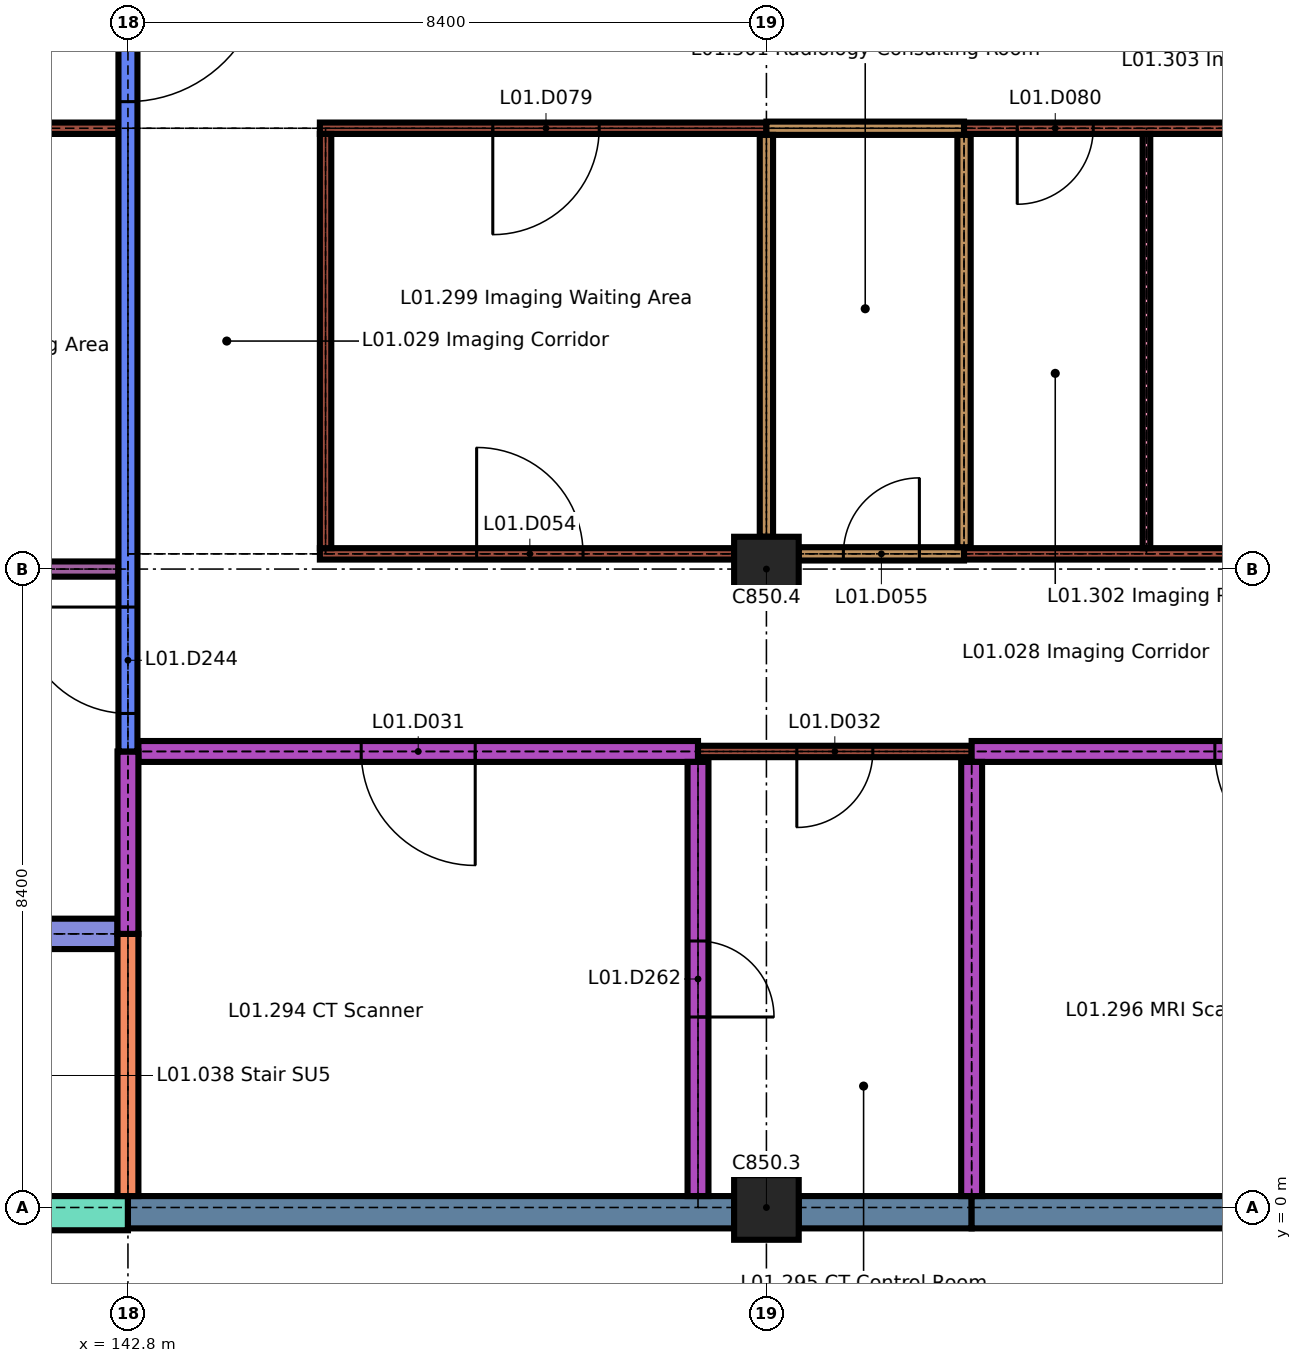
"""IFC4 building model, lengths in metres.
Left out: names, types, materials, properties, quantities, classifications, styles, units other than length and angle.
Written with IfcOpenShell. Run it as: python <this file> out.ifc"""

import sys

from ifc_helpers import new_model, si_unit, direction, frame, frame_2d, origin, origin_2d, place, context, subcontext, project, spatial, rectangle, extrude, element, fill, save


model = new_model("IFC4")
c1 = context("Model", 3, precision=1e-05, world=origin(), true_north=direction((0.0, 1.0)))
c2 = subcontext(c1, "Body", "Model", "MODEL_VIEW")
j1 = project(units=[si_unit("LENGTHUNIT", "METRE"), si_unit("PLANEANGLEUNIT", "RADIAN")], contexts=[c1])
p1 = place(None, origin())
s1 = spatial("IfcSite", under=j1, at=p1, CompositionType="ELEMENT")
p2 = place(p1, origin())
s2 = spatial("IfcBuilding", under=s1, at=p2, CompositionType="ELEMENT")
p3 = place(p2, frame((0.0, 0.0, 4.5)))
s3 = spatial("IfcBuildingStorey", under=s2, at=p3, CompositionType="ELEMENT", Elevation=4.5)
for number, where, z_axis, x_axis in (
    (1, (151.2, 0.0, 0.0), (0.0, 0.0, 1.0), (1.0, 0.0, 0.0)),
    (2, (151.2, 8.4, 0.0), (0.0, 0.0, 1.0), (1.0, 0.0, 0.0)),
):
    element("IfcColumn", number, at=place(p3, frame(where, z_axis=z_axis, x_axis=x_axis)), inside=s3, PredefinedType="COLUMN", context=c2, shape_type="SweptSolid", body=[
        extrude(rectangle(XDim=0.85, YDim=0.85, at=origin_2d()), origin(), (0.0, 0.0, 1.0), 3.45),
    ])
p4 = place(p3, frame((138.95, -0.075, 0.0), z_axis=(0.0, 0.0, 1.0), x_axis=(1.0, 0.0, 0.0)))
e3 = element("IfcWall", 3, at=p4, inside=s3, PredefinedType="SOLIDWALL", context=c2, shape_type="SweptSolid", body=[
    extrude(rectangle(XDim=3.85, YDim=0.45, at=frame_2d((1.925, 0.0))), origin(), (0.0, 0.0, 1.0), 3.45),
])
p5 = place(p3, frame((142.8, -0.062, 0.0), z_axis=(0.0, 0.0, 1.0), x_axis=(1.0, 0.0, 0.0)))
e4 = element("IfcWall", 4, at=p5, inside=s3, PredefinedType="SOLIDWALL", context=c2, shape_type="SweptSolid", body=[
    extrude(rectangle(XDim=7.975, YDim=0.425, at=frame_2d((3.987, 0.0))), origin(), (0.0, 0.0, 1.0), 3.15),
])
p6 = place(p3, frame((151.625, -0.062, 0.0), z_axis=(0.0, 0.0, 1.0), x_axis=(1.0, 0.0, 0.0)))
e5 = element("IfcWall", 5, at=p6, inside=s3, PredefinedType="SOLIDWALL", context=c2, shape_type="SweptSolid", body=[
    extrude(rectangle(XDim=2.275, YDim=0.425, at=frame_2d((1.137, 0.0))), origin(), (0.0, 0.0, 1.0), 3.15),
])
p7 = place(p3, frame((153.9, -0.062, 0.0), z_axis=(0.0, 0.0, 1.0), x_axis=(1.0, 0.0, 0.0)))
e6 = element("IfcWall", 6, at=p7, inside=s3, PredefinedType="SOLIDWALL", context=c2, shape_type="SweptSolid", body=[
    extrude(rectangle(XDim=5.275, YDim=0.425, at=frame_2d((2.638, 0.0))), origin(), (0.0, 0.0, 1.0), 3.15),
])
p8 = place(p3, frame((134.6, 3.6, 0.0), z_axis=(0.0, 0.0, 1.0), x_axis=(1.0, 0.0, 0.0)))
e7 = element("IfcWall", 7, at=p8, inside=s3, PredefinedType="SHEAR", context=c2, shape_type="SweptSolid", body=[
    extrude(rectangle(XDim=8.062, YDim=0.4, at=frame_2d((4.031, 0.0))), origin(), (0.0, 0.0, 1.0), 3.45),
])
p9 = place(p8, frame((0.4, 0.0, 0.0)))
e8 = element("IfcOpeningElement", 8, at=p9, cuts=e7, PredefinedType="OPENING", context=c2, shape_type="SweptSolid", body=[
    extrude(rectangle(XDim=1.2, YDim=2.1, at=frame_2d((0.6, 1.05))), frame((0.0, 0.21, 0.0), z_axis=(0.0, -1.0, 0.0), x_axis=(1.0, 0.0, 0.0)), (0.0, 0.0, 1.0), 0.42),
])
p10 = place(p3, frame((142.938, 6.0, 0.0), z_axis=(0.0, 0.0, 1.0), x_axis=(1.0, 0.0, 0.0)))
e9 = element("IfcWall", 9, at=p10, inside=s3, PredefinedType="SOLIDWALL", context=c2, shape_type="SweptSolid", body=[
    extrude(rectangle(XDim=7.363, YDim=0.275, at=frame_2d((3.681, 0.0))), origin(), (0.0, 0.0, 1.0), 3.45),
])
p11 = place(p10, frame((2.931, 0.0, 0.0)))
e10 = element("IfcOpeningElement", 10, at=p11, cuts=e9, PredefinedType="OPENING", context=c2, shape_type="SweptSolid", body=[
    extrude(rectangle(XDim=1.5, YDim=2.4, at=frame_2d((0.75, 1.2))), frame((0.0, 0.147, 0.0), z_axis=(0.0, -1.0, 0.0), x_axis=(1.0, 0.0, 0.0)), (0.0, 0.0, 1.0), 0.295),
])
p12 = place(p3, frame((150.3, 6.0, 0.0), z_axis=(0.0, 0.0, 1.0), x_axis=(1.0, 0.0, 0.0)))
e11 = element("IfcWall", 11, at=p12, inside=s3, PredefinedType="PARTITIONING", context=c2, shape_type="SweptSolid", body=[
    extrude(rectangle(XDim=3.6, YDim=0.15, at=frame_2d((1.8, 0.0))), origin(), (0.0, 0.0, 1.0), 3.45),
])
p13 = place(p12, frame((1.3, 0.0, 0.0)))
e12 = element("IfcOpeningElement", 12, at=p13, cuts=e11, PredefinedType="OPENING", context=c2, shape_type="SweptSolid", body=[
    extrude(rectangle(XDim=1.0, YDim=2.1, at=frame_2d((0.5, 1.05))), frame((0.0, 0.085, 0.0), z_axis=(0.0, -1.0, 0.0), x_axis=(1.0, 0.0, 0.0)), (0.0, 0.0, 1.0), 0.17),
])
p14 = place(p3, frame((153.9, 6.0, 0.0), z_axis=(0.0, 0.0, 1.0), x_axis=(1.0, 0.0, 0.0)))
e13 = element("IfcWall", 13, at=p14, inside=s3, PredefinedType="SOLIDWALL", context=c2, shape_type="SweptSolid", body=[
    extrude(rectangle(XDim=7.9, YDim=0.275, at=frame_2d((3.95, 0.0))), origin(), (0.0, 0.0, 1.0), 3.45),
])
p15 = place(p14, frame((3.2, 0.0, 0.0)))
e14 = element("IfcOpeningElement", 14, at=p15, cuts=e13, PredefinedType="OPENING", context=c2, shape_type="SweptSolid", body=[
    extrude(rectangle(XDim=1.5, YDim=2.4, at=frame_2d((0.75, 1.2))), frame((0.0, 0.147, 0.0), z_axis=(0.0, -1.0, 0.0), x_axis=(1.0, 0.0, 0.0)), (0.0, 0.0, 1.0), 0.295),
])
p16 = place(p3, frame((134.5, 8.4, 0.0), z_axis=(0.0, 0.0, 1.0), x_axis=(1.0, 0.0, 0.0)))
e15 = element("IfcWall", 15, at=p16, inside=s3, PredefinedType="PARTITIONING", context=c2, shape_type="SweptSolid", body=[
    extrude(rectangle(XDim=8.175, YDim=0.2, at=frame_2d((4.087, 0.0))), origin(), (0.0, 0.0, 1.0), 3.45),
])
p17 = place(p16, frame((3.387, 0.0, 0.0)))
e16 = element("IfcOpeningElement", 16, at=p17, cuts=e15, PredefinedType="OPENING", context=c2, shape_type="SweptSolid", body=[
    extrude(rectangle(XDim=1.4, YDim=2.1, at=frame_2d((0.7, 1.05))), frame((0.0, 0.11, 0.0), z_axis=(0.0, -1.0, 0.0), x_axis=(1.0, 0.0, 0.0)), (0.0, 0.0, 1.0), 0.22),
])
p18 = place(p3, frame((145.325, 8.6, 0.0), z_axis=(0.0, 0.0, 1.0), x_axis=(1.0, 0.0, 0.0)))
e17 = element("IfcWall", 17, at=p18, inside=s3, PredefinedType="PARTITIONING", context=c2, shape_type="SweptSolid", body=[
    extrude(rectangle(XDim=5.45, YDim=0.15, at=frame_2d((2.725, 0.0))), origin(), (0.0, 0.0, 1.0), 3.45),
])
p19 = place(p18, frame((2.062, 0.0, 0.0)))
e18 = element("IfcOpeningElement", 18, at=p19, cuts=e17, PredefinedType="OPENING", context=c2, shape_type="SweptSolid", body=[
    extrude(rectangle(XDim=1.4, YDim=2.1, at=frame_2d((0.7, 1.05))), frame((0.0, 0.085, 0.0), z_axis=(0.0, -1.0, 0.0), x_axis=(1.0, 0.0, 0.0)), (0.0, 0.0, 1.0), 0.17),
])
p20 = place(p3, frame((151.625, 8.6, 0.0), z_axis=(0.0, 0.0, 1.0), x_axis=(1.0, 0.0, 0.0)))
e19 = element("IfcWall", 19, at=p20, inside=s3, PredefinedType="PARTITIONING", context=c2, shape_type="SweptSolid", body=[
    extrude(rectangle(XDim=2.175, YDim=0.175, at=frame_2d((1.087, 0.0))), origin(), (0.0, 0.0, 1.0), 3.45),
])
p21 = place(p20, frame((0.587, 0.0, 0.0)))
e20 = element("IfcOpeningElement", 20, at=p21, cuts=e19, PredefinedType="OPENING", context=c2, shape_type="SweptSolid", body=[
    extrude(rectangle(XDim=1.0, YDim=2.1, at=frame_2d((0.5, 1.05))), frame((0.0, 0.097, 0.0), z_axis=(0.0, -1.0, 0.0), x_axis=(1.0, 0.0, 0.0)), (0.0, 0.0, 1.0), 0.195),
])
p22 = place(p3, frame((153.8, 8.6, 0.0), z_axis=(0.0, 0.0, 1.0), x_axis=(1.0, 0.0, 0.0)))
e21 = element("IfcWall", 21, at=p22, inside=s3, PredefinedType="PARTITIONING", context=c2, shape_type="SweptSolid", body=[
    extrude(rectangle(XDim=5.375, YDim=0.15, at=frame_2d((2.688, 0.0))), origin(), (0.0, 0.0, 1.0), 3.45),
])
p23 = place(p3, frame((131.4, 14.2, 0.0), z_axis=(0.0, 0.0, 1.0), x_axis=(1.0, 0.0, 0.0)))
e22 = element("IfcWall", 22, at=p23, inside=s3, PredefinedType="PARTITIONING", context=c2, shape_type="SweptSolid", body=[
    extrude(rectangle(XDim=11.275, YDim=0.15, at=frame_2d((5.638, 0.0))), origin(), (0.0, 0.0, 1.0), 3.45),
])
p24 = place(p23, frame((1.0, 0.0, 0.0)))
e23 = element("IfcOpeningElement", 23, at=p24, cuts=e22, PredefinedType="OPENING", context=c2, shape_type="SweptSolid", body=[
    extrude(rectangle(XDim=1.0, YDim=2.1, at=frame_2d((0.5, 1.05))), frame((0.0, 0.085, 0.0), z_axis=(0.0, -1.0, 0.0), x_axis=(1.0, 0.0, 0.0)), (0.0, 0.0, 1.0), 0.17),
])
p25 = place(p23, frame((6.438, 0.0, 0.0)))
e24 = element("IfcOpeningElement", 24, at=p25, cuts=e22, PredefinedType="OPENING", context=c2, shape_type="SweptSolid", body=[
    extrude(rectangle(XDim=1.4, YDim=2.1, at=frame_2d((0.7, 1.05))), frame((0.0, 0.085, 0.0), z_axis=(0.0, -1.0, 0.0), x_axis=(1.0, 0.0, 0.0)), (0.0, 0.0, 1.0), 0.17),
])
p26 = place(p3, frame((145.325, 14.2, 0.0), z_axis=(0.0, 0.0, 1.0), x_axis=(1.0, 0.0, 0.0)))
e25 = element("IfcWall", 25, at=p26, inside=s3, PredefinedType="PARTITIONING", context=c2, shape_type="SweptSolid", body=[
    extrude(rectangle(XDim=5.875, YDim=0.15, at=frame_2d((2.938, 0.0))), origin(), (0.0, 0.0, 1.0), 3.45),
])
p27 = place(p26, frame((2.275, 0.0, 0.0)))
e26 = element("IfcOpeningElement", 26, at=p27, cuts=e25, PredefinedType="OPENING", context=c2, shape_type="SweptSolid", body=[
    extrude(rectangle(XDim=1.4, YDim=2.1, at=frame_2d((0.7, 1.05))), frame((0.0, 0.085, 0.0), z_axis=(0.0, -1.0, 0.0), x_axis=(1.0, 0.0, 0.0)), (0.0, 0.0, 1.0), 0.17),
])
p28 = place(p3, frame((151.2, 14.2, 0.0), z_axis=(0.0, 0.0, 1.0), x_axis=(1.0, 0.0, 0.0)))
e27 = element("IfcWall", 27, at=p28, inside=s3, PredefinedType="PARTITIONING", context=c2, shape_type="SweptSolid", body=[
    extrude(rectangle(XDim=2.6, YDim=0.175, at=frame_2d((1.3, 0.0))), origin(), (0.0, 0.0, 1.0), 3.45),
])
p29 = place(p3, frame((153.8, 14.2, 0.0), z_axis=(0.0, 0.0, 1.0), x_axis=(1.0, 0.0, 0.0)))
e28 = element("IfcWall", 28, at=p29, inside=s3, PredefinedType="PARTITIONING", context=c2, shape_type="SweptSolid", body=[
    extrude(rectangle(XDim=11.875, YDim=0.15, at=frame_2d((5.938, 0.0))), origin(), (0.0, 0.0, 1.0), 3.45),
])
p30 = place(p29, frame((0.7, 0.0, 0.0)))
e29 = element("IfcOpeningElement", 29, at=p30, cuts=e28, PredefinedType="OPENING", context=c2, shape_type="SweptSolid", body=[
    extrude(rectangle(XDim=1.0, YDim=2.1, at=frame_2d((0.5, 1.05))), frame((0.0, 0.085, 0.0), z_axis=(0.0, -1.0, 0.0), x_axis=(1.0, 0.0, 0.0)), (0.0, 0.0, 1.0), 0.17),
])
p31 = place(p29, frame((3.6, 0.0, 0.0)))
e30 = element("IfcOpeningElement", 30, at=p31, cuts=e28, PredefinedType="OPENING", context=c2, shape_type="SweptSolid", body=[
    extrude(rectangle(XDim=1.0, YDim=2.1, at=frame_2d((0.5, 1.05))), frame((0.0, 0.085, 0.0), z_axis=(0.0, -1.0, 0.0), x_axis=(1.0, 0.0, 0.0)), (0.0, 0.0, 1.0), 0.17),
])
p32 = place(p3, frame((142.8, 0.15, 0.0), z_axis=(0.0, 0.0, 1.0), x_axis=(0.0, 1.0, 0.0)))
e31 = element("IfcWall", 31, at=p32, inside=s3, PredefinedType="SOLIDWALL", context=c2, shape_type="SweptSolid", body=[
    extrude(rectangle(XDim=3.45, YDim=0.275, at=frame_2d((1.725, 0.0))), origin(), (0.0, 0.0, 1.0), 3.45),
])
p33 = place(p3, frame((142.8, 3.6, 0.0), z_axis=(0.0, 0.0, 1.0), x_axis=(0.0, 1.0, 0.0)))
e32 = element("IfcWall", 32, at=p33, inside=s3, PredefinedType="SOLIDWALL", context=c2, shape_type="SweptSolid", body=[
    extrude(rectangle(XDim=2.4, YDim=0.275, at=frame_2d((1.2, 0.0))), origin(), (0.0, 0.0, 1.0), 3.45),
])
p34 = place(p3, frame((142.8, 6.0, 0.0), z_axis=(0.0, 0.0, 1.0), x_axis=(0.0, 1.0, 0.0)))
e33 = element("IfcWall", 33, at=p34, inside=s3, PredefinedType="SOLIDWALL", context=c2, shape_type="SweptSolid", body=[
    extrude(rectangle(XDim=10.7, YDim=0.25, at=frame_2d((5.35, 0.0))), origin(), (0.0, 0.0, 1.0), 3.45),
])
p35 = place(p34, frame((0.5, 0.0, 0.0)))
e34 = element("IfcOpeningElement", 34, at=p35, cuts=e33, PredefinedType="OPENING", context=c2, shape_type="SweptSolid", body=[
    extrude(rectangle(XDim=1.4, YDim=2.1, at=frame_2d((0.7, 1.05))), frame((0.0, 0.135, 0.0), z_axis=(0.0, -1.0, 0.0), x_axis=(1.0, 0.0, 0.0)), (0.0, 0.0, 1.0), 0.27),
])
p36 = place(p34, frame((8.55, 0.0, 0.0)))
e35 = element("IfcOpeningElement", 35, at=p36, cuts=e33, PredefinedType="OPENING", context=c2, shape_type="SweptSolid", body=[
    extrude(rectangle(XDim=1.8, YDim=2.4, at=frame_2d((0.9, 1.2))), frame((0.0, 0.135, 0.0), z_axis=(0.0, -1.0, 0.0), x_axis=(1.0, 0.0, 0.0)), (0.0, 0.0, 1.0), 0.27),
])
p37 = place(p3, frame((145.4, 8.675, 0.0), z_axis=(0.0, 0.0, 1.0), x_axis=(0.0, 1.0, 0.0)))
e36 = element("IfcWall", 36, at=p37, inside=s3, PredefinedType="PARTITIONING", context=c2, shape_type="SweptSolid", body=[
    extrude(rectangle(XDim=5.45, YDim=0.15, at=frame_2d((2.725, 0.0))), origin(), (0.0, 0.0, 1.0), 3.45),
])
p38 = place(p3, frame((150.3, 0.15, 0.0), z_axis=(0.0, 0.0, 1.0), x_axis=(0.0, 1.0, 0.0)))
e37 = element("IfcWall", 37, at=p38, inside=s3, PredefinedType="SOLIDWALL", context=c2, shape_type="SweptSolid", body=[
    extrude(rectangle(XDim=5.713, YDim=0.275, at=frame_2d((2.856, 0.0))), origin(), (0.0, 0.0, 1.0), 3.45),
])
p39 = place(p38, frame((2.356, 0.0, 0.0)))
e38 = element("IfcOpeningElement", 38, at=p39, cuts=e37, PredefinedType="OPENING", context=c2, shape_type="SweptSolid", body=[
    extrude(rectangle(XDim=1.0, YDim=2.1, at=frame_2d((0.5, 1.05))), frame((0.0, 0.147, 0.0), z_axis=(0.0, -1.0, 0.0), x_axis=(1.0, 0.0, 0.0)), (0.0, 0.0, 1.0), 0.295),
])
p40 = place(p3, frame((151.2, 8.825, 0.0), z_axis=(0.0, 0.0, 1.0), x_axis=(0.0, 1.0, 0.0)))
e39 = element("IfcWall", 39, at=p40, inside=s3, PredefinedType="PARTITIONING", context=c2, shape_type="SweptSolid", body=[
    extrude(rectangle(XDim=5.288, YDim=0.175, at=frame_2d((2.644, 0.0))), origin(), (0.0, 0.0, 1.0), 3.45),
])
p41 = place(p3, frame((153.8, 8.688, 0.0), z_axis=(0.0, 0.0, 1.0), x_axis=(0.0, 1.0, 0.0)))
e40 = element("IfcWall", 40, at=p41, inside=s3, PredefinedType="PARTITIONING", context=c2, shape_type="SweptSolid", body=[
    extrude(rectangle(XDim=5.425, YDim=0.175, at=frame_2d((2.712, 0.0))), origin(), (0.0, 0.0, 1.0), 3.45),
])
p42 = place(p3, frame((153.9, 0.15, 0.0), z_axis=(0.0, 0.0, 1.0), x_axis=(0.0, 1.0, 0.0)))
e41 = element("IfcWall", 41, at=p42, inside=s3, PredefinedType="SOLIDWALL", context=c2, shape_type="SweptSolid", body=[
    extrude(rectangle(XDim=5.713, YDim=0.275, at=frame_2d((2.856, 0.0))), origin(), (0.0, 0.0, 1.0), 3.45),
])
p43 = place(p3, frame((156.2, 8.675, 0.0), z_axis=(0.0, 0.0, 1.0), x_axis=(0.0, 1.0, 0.0)))
e42 = element("IfcWall", 42, at=p43, inside=s3, PredefinedType="PARTITIONING", context=c2, shape_type="SweptSolid", body=[
    extrude(rectangle(XDim=5.45, YDim=0.1, at=frame_2d((2.725, 0.0))), origin(), (0.0, 0.0, 1.0), 3.45),
])
p44 = place(p11, origin())
e43 = element("IfcDoor", 43, at=p44, inside=s3, OperationType="SINGLE_SWING_RIGHT", PredefinedType="DOOR", context=c2, shape_type="SweptSolid", body=[
    extrude(rectangle(XDim=1.5, YDim=2.4, at=frame_2d((0.75, 1.2))), frame((0.0, 0.045, 0.0), z_axis=(0.0, -1.0, 0.0), x_axis=(1.0, 0.0, 0.0)), (0.0, 0.0, 1.0), 0.09),
])
fill(e10, e43)
p45 = place(p13, origin())
e44 = element("IfcDoor", 44, at=p45, inside=s3, OperationType="SINGLE_SWING_LEFT", PredefinedType="DOOR", context=c2, shape_type="SweptSolid", body=[
    extrude(rectangle(XDim=1.0, YDim=2.1, at=frame_2d((0.5, 1.05))), frame((0.0, 0.025, 0.0), z_axis=(0.0, -1.0, 0.0), x_axis=(1.0, 0.0, 0.0)), (0.0, 0.0, 1.0), 0.05),
])
fill(e12, e44)
p46 = place(p15, origin())
e45 = element("IfcDoor", 45, at=p46, inside=s3, OperationType="SINGLE_SWING_RIGHT", PredefinedType="DOOR", context=c2, shape_type="SweptSolid", body=[
    extrude(rectangle(XDim=1.5, YDim=2.4, at=frame_2d((0.75, 1.2))), frame((0.0, 0.045, 0.0), z_axis=(0.0, -1.0, 0.0), x_axis=(1.0, 0.0, 0.0)), (0.0, 0.0, 1.0), 0.09),
])
fill(e14, e45)
p47 = place(p19, origin())
e46 = element("IfcDoor", 46, at=p47, inside=s3, OperationType="SINGLE_SWING_RIGHT", PredefinedType="DOOR", context=c2, shape_type="SweptSolid", body=[
    extrude(rectangle(XDim=1.4, YDim=2.1, at=frame_2d((0.7, 1.05))), frame((0.0, 0.025, 0.0), z_axis=(0.0, -1.0, 0.0), x_axis=(1.0, 0.0, 0.0)), (0.0, 0.0, 1.0), 0.05),
])
fill(e18, e46)
p48 = place(p21, origin())
e47 = element("IfcDoor", 47, at=p48, inside=s3, OperationType="SINGLE_SWING_LEFT", PredefinedType="DOOR", context=c2, shape_type="SweptSolid", body=[
    extrude(rectangle(XDim=1.0, YDim=2.1, at=frame_2d((0.5, 1.05))), frame((0.0, 0.035, 0.0), z_axis=(0.0, -1.0, 0.0), x_axis=(1.0, 0.0, 0.0)), (0.0, 0.0, 1.0), 0.07),
])
fill(e20, e47)
p49 = place(p27, origin())
e48 = element("IfcDoor", 48, at=p49, inside=s3, OperationType="SINGLE_SWING_LEFT", PredefinedType="DOOR", context=c2, shape_type="SweptSolid", body=[
    extrude(rectangle(XDim=1.4, YDim=2.1, at=frame_2d((0.7, 1.05))), frame((0.0, 0.025, 0.0), z_axis=(0.0, -1.0, 0.0), x_axis=(1.0, 0.0, 0.0)), (0.0, 0.0, 1.0), 0.05),
])
fill(e26, e48)
p50 = place(p30, origin())
e49 = element("IfcDoor", 49, at=p50, inside=s3, OperationType="SINGLE_SWING_LEFT", PredefinedType="DOOR", context=c2, shape_type="SweptSolid", body=[
    extrude(rectangle(XDim=1.0, YDim=2.1, at=frame_2d((0.5, 1.05))), frame((0.0, 0.025, 0.0), z_axis=(0.0, -1.0, 0.0), x_axis=(1.0, 0.0, 0.0)), (0.0, 0.0, 1.0), 0.05),
])
fill(e29, e49)
p51 = place(p35, origin())
e50 = element("IfcDoor", 50, at=p51, inside=s3, OperationType="SINGLE_SWING_LEFT", PredefinedType="DOOR", context=c2, shape_type="SweptSolid", body=[
    extrude(rectangle(XDim=1.4, YDim=2.1, at=frame_2d((0.7, 1.05))), frame((0.0, 0.03, 0.0), z_axis=(0.0, -1.0, 0.0), x_axis=(1.0, 0.0, 0.0)), (0.0, 0.0, 1.0), 0.06),
])
fill(e34, e50)
p52 = place(p36, origin())
e51 = element("IfcDoor", 51, at=p52, inside=s3, OperationType="SINGLE_SWING_RIGHT", PredefinedType="DOOR", context=c2, shape_type="SweptSolid", body=[
    extrude(rectangle(XDim=1.8, YDim=2.4, at=frame_2d((0.9, 1.2))), frame((0.0, 0.03, 0.0), z_axis=(0.0, -1.0, 0.0), x_axis=(1.0, 0.0, 0.0)), (0.0, 0.0, 1.0), 0.06),
])
fill(e35, e51)
p53 = place(p39, origin())
e52 = element("IfcDoor", 52, at=p53, inside=s3, OperationType="SINGLE_SWING_LEFT", PredefinedType="DOOR", context=c2, shape_type="SweptSolid", body=[
    extrude(rectangle(XDim=1.0, YDim=2.1, at=frame_2d((0.5, 1.05))), frame((0.0, 0.04, 0.0), z_axis=(0.0, -1.0, 0.0), x_axis=(1.0, 0.0, 0.0)), (0.0, 0.0, 1.0), 0.08),
])
fill(e38, e52)
save(model, sys.argv[1])
